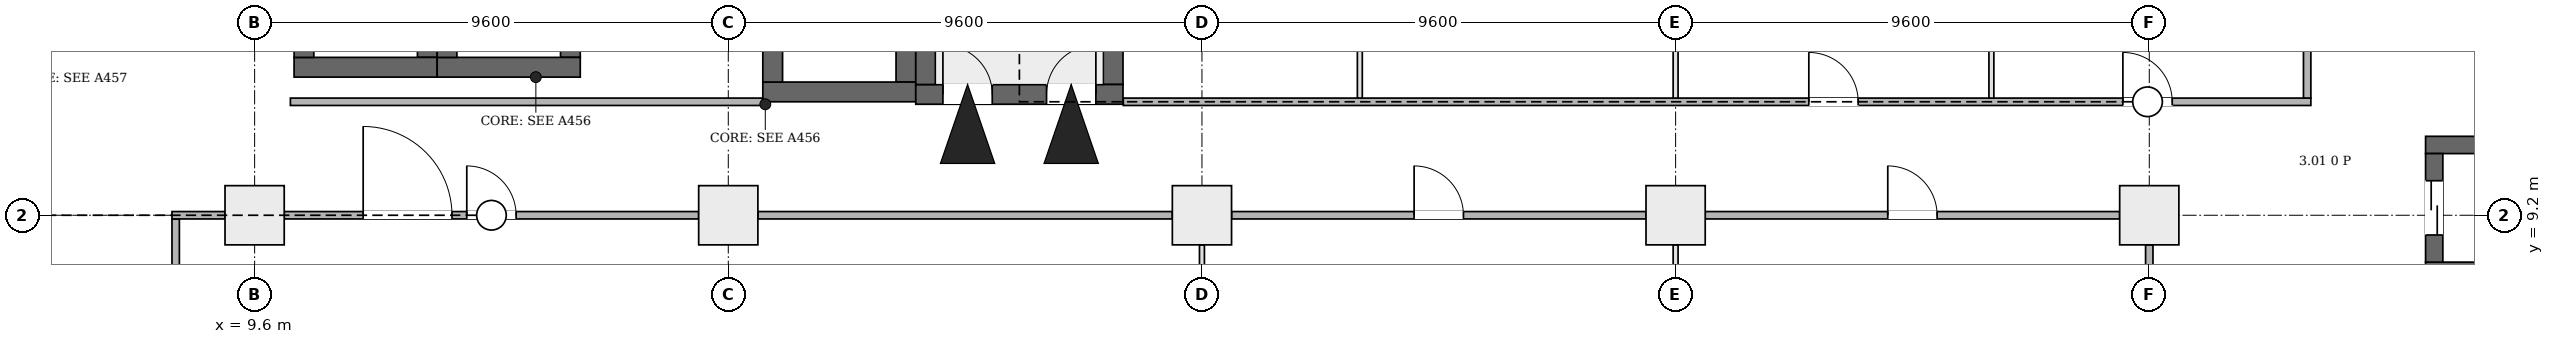
"""IFC4 building model, lengths in metres.
Left out: names, types, materials, properties, quantities, classifications, styles, units other than length and angle.
Written with IfcOpenShell. Run it as: python <this file> out.ifc"""

import sys

from ifc_helpers import new_model, si_unit, direction, frame, frame_2d, origin, origin_2d, place, context, subcontext, project, spatial, rectangle, extrude, element, fill, save


model = new_model("IFC4")
c1 = context("Model", 3, precision=1e-05, world=origin(), true_north=direction((0.0, 1.0)))
c2 = subcontext(c1, "Body", "Model", "MODEL_VIEW")
j1 = project(units=[si_unit("LENGTHUNIT", "METRE"), si_unit("PLANEANGLEUNIT", "RADIAN")], contexts=[c1])
p1 = place(None, origin())
s1 = spatial("IfcSite", under=j1, at=p1, CompositionType="ELEMENT")
p2 = place(p1, origin())
s2 = spatial("IfcBuilding", under=s1, at=p2, CompositionType="ELEMENT")
p3 = place(p2, frame((0.0, 0.0, 21.7)))
s3 = spatial("IfcBuildingStorey", under=s2, at=p3, CompositionType="ELEMENT", Elevation=21.7)
p4 = place(p3, frame((23.0, 11.65, 0.0), z_axis=(0.0, 0.0, 1.0), x_axis=(1.0, 0.0, 0.0)))
e1 = element("IfcWall", 1, at=p4, inside=s3, PredefinedType="SHEAR", context=c2, shape_type="SweptSolid", body=[
    extrude(rectangle(XDim=4.2, YDim=0.4, at=frame_2d((2.1, 0.0))), origin(), (0.0, 0.0, 1.0), 5.0),
])
p5 = place(p4, frame((0.55, 0.0, 0.0)))
e2 = element("IfcOpeningElement", 2, at=p5, cuts=e1, PredefinedType="OPENING", context=c2, shape_type="SweptSolid", body=[
    extrude(rectangle(XDim=1.0, YDim=2.1, at=frame_2d((0.5, 1.05))), frame((0.0, 0.21, 0.0), z_axis=(0.0, -1.0, 0.0), x_axis=(1.0, 0.0, 0.0)), (0.0, 0.0, 1.0), 0.42),
])
p6 = place(p4, frame((2.65, 0.0, 0.0)))
e3 = element("IfcOpeningElement", 3, at=p6, cuts=e1, PredefinedType="OPENING", context=c2, shape_type="SweptSolid", body=[
    extrude(rectangle(XDim=1.0, YDim=2.1, at=frame_2d((0.5, 1.05))), frame((0.0, 0.21, 0.0), z_axis=(0.0, -1.0, 0.0), x_axis=(1.0, 0.0, 0.0)), (0.0, 0.0, 1.0), 0.42),
])
for number, where, z_axis, x_axis in (
    (4, (23.2, 11.85, 0.0), (0.0, 0.0, 1.0), (0.0, 1.0, 0.0)),
    (5, (27.0, 11.85, 0.0), (0.0, 0.0, 1.0), (0.0, 1.0, 0.0)),
):
    element("IfcWall", number, at=place(p3, frame(where, z_axis=z_axis, x_axis=x_axis)), inside=s3, PredefinedType="SHEAR", context=c2, shape_type="SweptSolid", body=[
        extrude(rectangle(XDim=6.6, YDim=0.4, at=frame_2d((3.3, 0.0))), origin(), (0.0, 0.0, 1.0), 5.0),
    ])
for number, where, z_axis, x_axis in (
    (6, (53.6, 8.075, 0.0), (0.0, 0.0, 1.0), (1.0, 0.0, 0.0)),
    (7, (53.6, 10.625, 0.0), (0.0, 0.0, 1.0), (1.0, 0.0, 0.0)),
):
    element("IfcWall", number, at=place(p3, frame(where, z_axis=z_axis, x_axis=x_axis)), inside=s3, PredefinedType="SHEAR", context=c2, shape_type="SweptSolid", body=[
        extrude(rectangle(XDim=3.8, YDim=0.35, at=frame_2d((1.9, 0.0))), origin(), (0.0, 0.0, 1.0), 5.0),
    ])
p7 = place(p3, frame((53.775, 8.25, 0.0), z_axis=(0.0, 0.0, 1.0), x_axis=(0.0, 1.0, 0.0)))
e8 = element("IfcWall", 8, at=p7, inside=s3, PredefinedType="SHEAR", context=c2, shape_type="SweptSolid", body=[
    extrude(rectangle(XDim=2.2, YDim=0.35, at=frame_2d((1.1, 0.0))), origin(), (0.0, 0.0, 1.0), 5.0),
])
p8 = place(p7, frame((0.55, 0.0, 0.0)))
e9 = element("IfcOpeningElement", 9, at=p8, cuts=e8, PredefinedType="OPENING", context=c2, shape_type="SweptSolid", body=[
    extrude(rectangle(XDim=1.1, YDim=2.1, at=frame_2d((0.55, 1.05))), frame((0.0, 0.185, 0.0), z_axis=(0.0, -1.0, 0.0), x_axis=(1.0, 0.0, 0.0)), (0.0, 0.0, 1.0), 0.37),
])
p9 = place(p3, frame((10.4, 12.2, 0.0), z_axis=(0.0, 0.0, 1.0), x_axis=(1.0, 0.0, 0.0)))
e10 = element("IfcWall", 10, at=p9, inside=s3, PredefinedType="SHEAR", context=c2, shape_type="SweptSolid", body=[
    extrude(rectangle(XDim=2.9, YDim=0.4, at=frame_2d((1.45, 0.0))), origin(), (0.0, 0.0, 1.0), 5.0),
])
for number, where, z_axis, x_axis in (
    (11, (10.6, 12.4, 0.0), (0.0, 0.0, 1.0), (0.0, 1.0, 0.0)),
    (12, (13.1, 12.4, 0.0), (0.0, 0.0, 1.0), (0.0, 1.0, 0.0)),
):
    element("IfcWall", number, at=place(p3, frame(where, z_axis=z_axis, x_axis=x_axis)), inside=s3, PredefinedType="SHEAR", context=c2, shape_type="SweptSolid", body=[
        extrude(rectangle(XDim=3.0, YDim=0.4, at=frame_2d((1.5, 0.0))), origin(), (0.0, 0.0, 1.0), 5.0),
    ])
p10 = place(p3, frame((13.3, 12.2, 0.0), z_axis=(0.0, 0.0, 1.0), x_axis=(1.0, 0.0, 0.0)))
e13 = element("IfcWall", 13, at=p10, inside=s3, PredefinedType="SHEAR", context=c2, shape_type="SweptSolid", body=[
    extrude(rectangle(XDim=2.9, YDim=0.4, at=frame_2d((1.45, 0.0))), origin(), (0.0, 0.0, 1.0), 5.0),
])
for number, where, z_axis, x_axis in (
    (14, (13.5, 12.4, 0.0), (0.0, 0.0, 1.0), (0.0, 1.0, 0.0)),
    (15, (16.0, 12.4, 0.0), (0.0, 0.0, 1.0), (0.0, 1.0, 0.0)),
):
    element("IfcWall", number, at=place(p3, frame(where, z_axis=z_axis, x_axis=x_axis)), inside=s3, PredefinedType="SHEAR", context=c2, shape_type="SweptSolid", body=[
        extrude(rectangle(XDim=3.0, YDim=0.4, at=frame_2d((1.5, 0.0))), origin(), (0.0, 0.0, 1.0), 5.0),
    ])
p11 = place(p3, frame((19.9, 11.7, 0.0), z_axis=(0.0, 0.0, 1.0), x_axis=(1.0, 0.0, 0.0)))
e16 = element("IfcWall", 16, at=p11, inside=s3, PredefinedType="SHEAR", context=c2, shape_type="SweptSolid", body=[
    extrude(rectangle(XDim=3.1, YDim=0.4, at=frame_2d((1.55, 0.0))), origin(), (0.0, 0.0, 1.0), 5.0),
])
for number, where, z_axis, x_axis in (
    (17, (20.1, 11.9, 0.0), (0.0, 0.0, 1.0), (0.0, 1.0, 0.0)),
    (18, (22.8, 11.9, 0.0), (0.0, 0.0, 1.0), (0.0, 1.0, 0.0)),
):
    element("IfcWall", number, at=place(p3, frame(where, z_axis=z_axis, x_axis=x_axis)), inside=s3, PredefinedType="SHEAR", context=c2, shape_type="SweptSolid", body=[
        extrude(rectangle(XDim=3.4, YDim=0.4, at=frame_2d((1.7, 0.0))), origin(), (0.0, 0.0, 1.0), 5.0),
    ])
for number, where, z_axis, x_axis in (
    (19, (9.6, 9.2, 0.0), (0.0, 0.0, 1.0), (1.0, 0.0, 0.0)),
    (20, (19.2, 9.2, 0.0), (0.0, 0.0, 1.0), (1.0, 0.0, 0.0)),
    (21, (28.8, 9.2, 0.0), (0.0, 0.0, 1.0), (1.0, 0.0, 0.0)),
    (22, (38.4, 9.2, 0.0), (0.0, 0.0, 1.0), (1.0, 0.0, 0.0)),
    (23, (48.0, 9.2, 0.0), (0.0, 0.0, 1.0), (1.0, 0.0, 0.0)),
):
    element("IfcColumn", number, at=place(p3, frame(where, z_axis=z_axis, x_axis=x_axis)), inside=s3, PredefinedType="COLUMN", context=c2, shape_type="SweptSolid", body=[
        extrude(rectangle(XDim=1.2, YDim=1.2, at=origin_2d()), origin(), (0.0, 0.0, 1.0), 5.0),
    ])
p12 = place(p3, frame((8.0, 0.206, 0.0), z_axis=(0.0, 0.0, 1.0), x_axis=(0.0, 1.0, 0.0)))
e24 = element("IfcWall", 24, at=p12, inside=s3, PredefinedType="PARTITIONING", context=c2, shape_type="SweptSolid", body=[
    extrude(rectangle(XDim=8.919, YDim=0.15, at=frame_2d((4.459, 0.0))), origin(), (0.0, 0.0, 1.0), 4.65),
])
p13 = place(p3, frame((7.925, 9.2, 0.0), z_axis=(0.0, 0.0, 1.0), x_axis=(1.0, 0.0, 0.0)))
e25 = element("IfcWall", 25, at=p13, inside=s3, PredefinedType="PARTITIONING", context=c2, shape_type="SweptSolid", body=[
    extrude(rectangle(XDim=1.075, YDim=0.15, at=frame_2d((0.538, 0.0))), origin(), (0.0, 0.0, 1.0), 4.25),
])
p14 = place(p3, frame((10.2, 9.2, 0.0), z_axis=(0.0, 0.0, 1.0), x_axis=(1.0, 0.0, 0.0)))
e26 = element("IfcWall", 26, at=p14, inside=s3, PredefinedType="PARTITIONING", context=c2, shape_type="SweptSolid", body=[
    extrude(rectangle(XDim=8.4, YDim=0.15, at=frame_2d((4.2, 0.0))), origin(), (0.0, 0.0, 1.0), 4.25),
])
p15 = place(p14, frame((3.7, 0.0, 0.0)))
e27 = element("IfcOpeningElement", 27, at=p15, cuts=e26, PredefinedType="OPENING", context=c2, shape_type="SweptSolid", body=[
    extrude(rectangle(XDim=1.0, YDim=2.1, at=frame_2d((0.5, 1.05))), frame((0.0, 0.085, 0.0), z_axis=(0.0, -1.0, 0.0), x_axis=(1.0, 0.0, 0.0)), (0.0, 0.0, 1.0), 0.17),
])
p16 = place(p14, frame((1.6, 0.0, 0.0)))
e28 = element("IfcOpeningElement", 28, at=p16, cuts=e26, PredefinedType="OPENING", context=c2, shape_type="SweptSolid", body=[
    extrude(rectangle(XDim=1.8, YDim=2.1, at=frame_2d((0.9, 1.05))), frame((0.0, 0.085, 0.0), z_axis=(0.0, -1.0, 0.0), x_axis=(1.0, 0.0, 0.0)), (0.0, 0.0, 1.0), 0.17),
])
p17 = place(p3, frame((10.325, 11.5, 0.0), z_axis=(0.0, 0.0, 1.0), x_axis=(1.0, 0.0, 0.0)))
e29 = element("IfcWall", 29, at=p17, inside=s3, PredefinedType="PARTITIONING", context=c2, shape_type="SweptSolid", body=[
    extrude(rectangle(XDim=9.569, YDim=0.15, at=frame_2d((4.785, 0.0))), origin(), (0.0, 0.0, 1.0), 4.65),
])
p18 = place(p3, frame((19.8, 9.2, 0.0), z_axis=(0.0, 0.0, 1.0), x_axis=(1.0, 0.0, 0.0)))
e30 = element("IfcWall", 30, at=p18, inside=s3, PredefinedType="PARTITIONING", context=c2, shape_type="SweptSolid", body=[
    extrude(rectangle(XDim=8.4, YDim=0.15, at=frame_2d((4.2, 0.0))), origin(), (0.0, 0.0, 1.0), 4.25),
])
p19 = place(p3, frame((27.206, 11.5, 0.0), z_axis=(0.0, 0.0, 1.0), x_axis=(1.0, 0.0, 0.0)))
e31 = element("IfcWall", 31, at=p19, inside=s3, PredefinedType="PARTITIONING", context=c2, shape_type="SweptSolid", body=[
    extrude(rectangle(XDim=24.069, YDim=0.15, at=frame_2d((12.034, 0.0))), origin(), (0.0, 0.0, 1.0), 4.65),
])
p20 = place(p19, frame((13.894, 0.0, 0.0)))
e32 = element("IfcOpeningElement", 32, at=p20, cuts=e31, PredefinedType="OPENING", context=c2, shape_type="SweptSolid", body=[
    extrude(rectangle(XDim=1.0, YDim=2.1, at=frame_2d((0.5, 1.05))), frame((0.0, 0.085, 0.0), z_axis=(0.0, -1.0, 0.0), x_axis=(1.0, 0.0, 0.0)), (0.0, 0.0, 1.0), 0.17),
])
p21 = place(p19, frame((20.259, 0.0, 0.0)))
e33 = element("IfcOpeningElement", 33, at=p21, cuts=e31, PredefinedType="OPENING", context=c2, shape_type="SweptSolid", body=[
    extrude(rectangle(XDim=1.0, YDim=2.1, at=frame_2d((0.5, 1.05))), frame((0.0, 0.085, 0.0), z_axis=(0.0, -1.0, 0.0), x_axis=(1.0, 0.0, 0.0)), (0.0, 0.0, 1.0), 0.17),
])
p22 = place(p3, frame((28.8, 1.05, 0.0), z_axis=(0.0, 0.0, 1.0), x_axis=(0.0, 1.0, 0.0)))
e34 = element("IfcWall", 34, at=p22, inside=s3, PredefinedType="PARTITIONING", context=c2, shape_type="SweptSolid", body=[
    extrude(rectangle(XDim=7.55, YDim=0.1, at=frame_2d((3.775, 0.0))), origin(), (0.0, 0.0, 1.0), 4.25),
])
p23 = place(p3, frame((29.4, 9.2, 0.0), z_axis=(0.0, 0.0, 1.0), x_axis=(1.0, 0.0, 0.0)))
e35 = element("IfcWall", 35, at=p23, inside=s3, PredefinedType="PARTITIONING", context=c2, shape_type="SweptSolid", body=[
    extrude(rectangle(XDim=8.4, YDim=0.15, at=frame_2d((4.2, 0.0))), origin(), (0.0, 0.0, 1.0), 4.25),
])
p24 = place(p23, frame((3.7, 0.0, 0.0)))
e36 = element("IfcOpeningElement", 36, at=p24, cuts=e35, PredefinedType="OPENING", context=c2, shape_type="SweptSolid", body=[
    extrude(rectangle(XDim=1.0, YDim=2.1, at=frame_2d((0.5, 1.05))), frame((0.0, 0.085, 0.0), z_axis=(0.0, -1.0, 0.0), x_axis=(1.0, 0.0, 0.0)), (0.0, 0.0, 1.0), 0.17),
])
p25 = place(p3, frame((32.0, 11.575, 0.0), z_axis=(0.0, 0.0, 1.0), x_axis=(0.0, 1.0, 0.0)))
e37 = element("IfcWall", 37, at=p25, inside=s3, PredefinedType="PARTITIONING", context=c2, shape_type="SweptSolid", body=[
    extrude(rectangle(XDim=9.55, YDim=0.1, at=frame_2d((4.775, 0.0))), origin(), (0.0, 0.0, 1.0), 4.65),
])
p26 = place(p3, frame((38.4, 1.05, 0.0), z_axis=(0.0, 0.0, 1.0), x_axis=(0.0, 1.0, 0.0)))
e38 = element("IfcWall", 38, at=p26, inside=s3, PredefinedType="PARTITIONING", context=c2, shape_type="SweptSolid", body=[
    extrude(rectangle(XDim=7.55, YDim=0.1, at=frame_2d((3.775, 0.0))), origin(), (0.0, 0.0, 1.0), 4.25),
])
p27 = place(p3, frame((38.4, 11.575, 0.0), z_axis=(0.0, 0.0, 1.0), x_axis=(0.0, 1.0, 0.0)))
e39 = element("IfcWall", 39, at=p27, inside=s3, PredefinedType="PARTITIONING", context=c2, shape_type="SweptSolid", body=[
    extrude(rectangle(XDim=6.225, YDim=0.1, at=frame_2d((3.113, 0.0))), origin(), (0.0, 0.0, 1.0), 4.25),
])
p28 = place(p3, frame((39.0, 9.2, 0.0), z_axis=(0.0, 0.0, 1.0), x_axis=(1.0, 0.0, 0.0)))
e40 = element("IfcWall", 40, at=p28, inside=s3, PredefinedType="PARTITIONING", context=c2, shape_type="SweptSolid", body=[
    extrude(rectangle(XDim=8.4, YDim=0.15, at=frame_2d((4.2, 0.0))), origin(), (0.0, 0.0, 1.0), 4.25),
])
p29 = place(p28, frame((3.7, 0.0, 0.0)))
e41 = element("IfcOpeningElement", 41, at=p29, cuts=e40, PredefinedType="OPENING", context=c2, shape_type="SweptSolid", body=[
    extrude(rectangle(XDim=1.0, YDim=2.1, at=frame_2d((0.5, 1.05))), frame((0.0, 0.085, 0.0), z_axis=(0.0, -1.0, 0.0), x_axis=(1.0, 0.0, 0.0)), (0.0, 0.0, 1.0), 0.17),
])
p30 = place(p3, frame((44.8, 11.575, 0.0), z_axis=(0.0, 0.0, 1.0), x_axis=(0.0, 1.0, 0.0)))
e42 = element("IfcWall", 42, at=p30, inside=s3, PredefinedType="PARTITIONING", context=c2, shape_type="SweptSolid", body=[
    extrude(rectangle(XDim=7.35, YDim=0.1, at=frame_2d((3.675, 0.0))), origin(), (0.0, 0.0, 1.0), 4.65),
])
p31 = place(p3, frame((48.0, 1.05, 0.0), z_axis=(0.0, 0.0, 1.0), x_axis=(0.0, 1.0, 0.0)))
e43 = element("IfcWall", 43, at=p31, inside=s3, PredefinedType="PARTITIONING", context=c2, shape_type="SweptSolid", body=[
    extrude(rectangle(XDim=7.55, YDim=0.15, at=frame_2d((3.775, 0.0))), origin(), (0.0, 0.0, 1.0), 4.25),
])
p32 = place(p3, frame((51.2, 11.575, 0.0), z_axis=(0.0, 0.0, 1.0), x_axis=(0.0, 1.0, 0.0)))
e44 = element("IfcWall", 44, at=p32, inside=s3, PredefinedType="PARTITIONING", context=c2, shape_type="SweptSolid", body=[
    extrude(rectangle(XDim=7.35, YDim=0.15, at=frame_2d((3.675, 0.0))), origin(), (0.0, 0.0, 1.0), 4.65),
])
p33 = place(p5, origin())
e45 = element("IfcDoor", 45, at=p33, inside=s3, OperationType="SINGLE_SWING_RIGHT", PredefinedType="DOOR", context=c2, shape_type="SweptSolid", body=[
    extrude(rectangle(XDim=1.0, YDim=2.1, at=frame_2d((0.5, 1.05))), frame((0.0, 0.025, 0.0), z_axis=(0.0, -1.0, 0.0), x_axis=(1.0, 0.0, 0.0)), (0.0, 0.0, 1.0), 0.05),
])
fill(e2, e45)
p34 = place(p6, origin())
e46 = element("IfcDoor", 46, at=p34, inside=s3, OperationType="SINGLE_SWING_LEFT", PredefinedType="DOOR", context=c2, shape_type="SweptSolid", body=[
    extrude(rectangle(XDim=1.0, YDim=2.1, at=frame_2d((0.5, 1.05))), frame((0.0, 0.025, 0.0), z_axis=(0.0, -1.0, 0.0), x_axis=(1.0, 0.0, 0.0)), (0.0, 0.0, 1.0), 0.05),
])
fill(e3, e46)
p35 = place(p8, origin())
e47 = element("IfcDoor", 47, at=p35, inside=s3, OperationType="DOUBLE_DOOR_SLIDING", PredefinedType="DOOR", context=c2, shape_type="SweptSolid", body=[
    extrude(rectangle(XDim=1.1, YDim=2.1, at=frame_2d((0.55, 1.05))), frame((0.0, 0.025, 0.0), z_axis=(0.0, -1.0, 0.0), x_axis=(1.0, 0.0, 0.0)), (0.0, 0.0, 1.0), 0.05),
])
fill(e9, e47)
p36 = place(p20, origin())
e48 = element("IfcDoor", 48, at=p36, inside=s3, OperationType="SINGLE_SWING_RIGHT", PredefinedType="DOOR", context=c2, shape_type="SweptSolid", body=[
    extrude(rectangle(XDim=1.0, YDim=2.1, at=frame_2d((0.5, 1.05))), frame((0.0, 0.025, 0.0), z_axis=(0.0, -1.0, 0.0), x_axis=(1.0, 0.0, 0.0)), (0.0, 0.0, 1.0), 0.05),
])
fill(e32, e48)
p37 = place(p21, origin())
e49 = element("IfcDoor", 49, at=p37, inside=s3, OperationType="SINGLE_SWING_RIGHT", PredefinedType="DOOR", context=c2, shape_type="SweptSolid", body=[
    extrude(rectangle(XDim=1.0, YDim=2.1, at=frame_2d((0.5, 1.05))), frame((0.0, 0.025, 0.0), z_axis=(0.0, -1.0, 0.0), x_axis=(1.0, 0.0, 0.0)), (0.0, 0.0, 1.0), 0.05),
])
fill(e33, e49)
p38 = place(p15, origin())
e50 = element("IfcDoor", 50, at=p38, inside=s3, OperationType="SINGLE_SWING_LEFT", PredefinedType="DOOR", context=c2, shape_type="SweptSolid", body=[
    extrude(rectangle(XDim=1.0, YDim=2.1, at=frame_2d((0.5, 1.05))), frame((0.0, 0.025, 0.0), z_axis=(0.0, -1.0, 0.0), x_axis=(1.0, 0.0, 0.0)), (0.0, 0.0, 1.0), 0.05),
])
fill(e27, e50)
p39 = place(p24, origin())
e51 = element("IfcDoor", 51, at=p39, inside=s3, OperationType="SINGLE_SWING_LEFT", PredefinedType="DOOR", context=c2, shape_type="SweptSolid", body=[
    extrude(rectangle(XDim=1.0, YDim=2.1, at=frame_2d((0.5, 1.05))), frame((0.0, 0.025, 0.0), z_axis=(0.0, -1.0, 0.0), x_axis=(1.0, 0.0, 0.0)), (0.0, 0.0, 1.0), 0.05),
])
fill(e36, e51)
p40 = place(p29, origin())
e52 = element("IfcDoor", 52, at=p40, inside=s3, OperationType="SINGLE_SWING_LEFT", PredefinedType="DOOR", context=c2, shape_type="SweptSolid", body=[
    extrude(rectangle(XDim=1.0, YDim=2.1, at=frame_2d((0.5, 1.05))), frame((0.0, 0.025, 0.0), z_axis=(0.0, -1.0, 0.0), x_axis=(1.0, 0.0, 0.0)), (0.0, 0.0, 1.0), 0.05),
])
fill(e41, e52)
p41 = place(p16, origin())
e53 = element("IfcDoor", 53, at=p41, inside=s3, OperationType="DOUBLE_DOOR_SINGLE_SWING", PredefinedType="DOOR", context=c2, shape_type="SweptSolid", body=[
    extrude(rectangle(XDim=1.8, YDim=2.1, at=frame_2d((0.9, 1.05))), frame((0.0, 0.025, 0.0), z_axis=(0.0, -1.0, 0.0), x_axis=(1.0, 0.0, 0.0)), (0.0, 0.0, 1.0), 0.05),
])
fill(e28, e53)
save(model, sys.argv[1])
